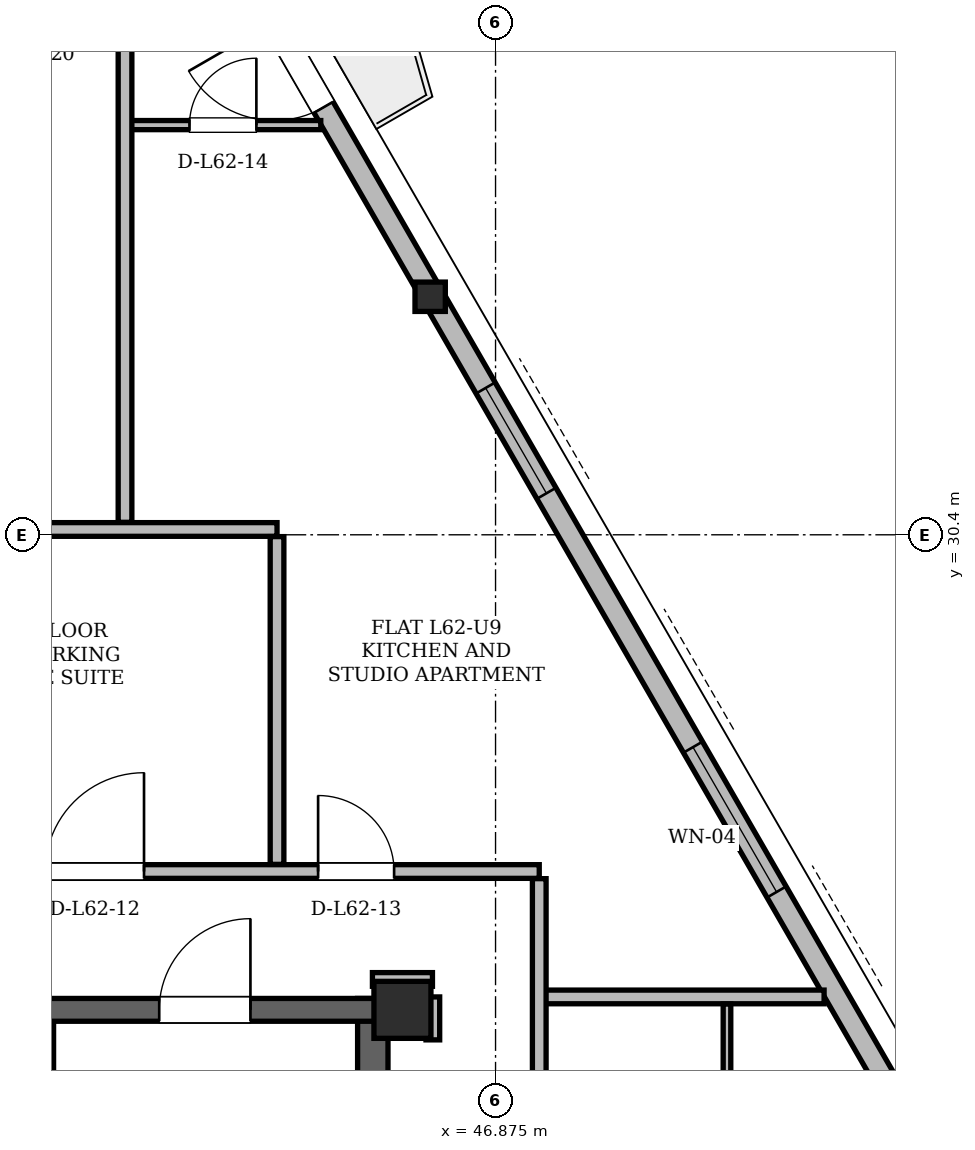
"""IFC4 building model, lengths in metres.
Left out: names, types, materials, properties, quantities, classifications, styles, units other than length and angle.
Written with IfcOpenShell. Run it as: python <this file> out.ifc"""

import sys

from ifc_helpers import new_model, si_unit, direction, frame, frame_2d, origin, origin_2d, place, context, subcontext, project, spatial, rectangle, hollow_rectangle, i_section, extrude, element, fill, save


model = new_model("IFC4")
c1 = context("Model", 3, precision=1e-05, world=origin(), true_north=direction((0.0, 1.0)))
c2 = subcontext(c1, "Body", "Model", "MODEL_VIEW")
j1 = project(units=[si_unit("LENGTHUNIT", "METRE"), si_unit("PLANEANGLEUNIT", "RADIAN")], contexts=[c1])
p1 = place(None, origin())
s1 = spatial("IfcSite", under=j1, at=p1, CompositionType="ELEMENT")
p2 = place(p1, origin())
s2 = spatial("IfcBuilding", under=s1, at=p2, CompositionType="ELEMENT")
p3 = place(p2, frame((0.0, 0.0, 234.3)))
s3 = spatial("IfcBuildingStorey", under=s2, at=p3, CompositionType="ELEMENT", Elevation=234.3)
p4 = place(p3, frame((45.65, 24.15, 0.0), z_axis=(0.0, 0.0, 1.0), x_axis=(1.0, 0.0, 0.0)))
e1 = element("IfcColumn", 1, at=p4, inside=s3, PredefinedType="COLUMN", context=c2, shape_type="SweptSolid", body=[
    extrude(hollow_rectangle(XDim=0.75, YDim=0.75, WallThickness=0.06, at=origin_2d()), origin(), (0.0, 0.0, 1.0), 3.6),
])
p5 = place(p3, frame((46.045, 33.543, 0.004), z_axis=(-0.016857685475, -0.006389606591, 0.999837482478), x_axis=(0.354426896262, -0.935083726308, 0.0)))
e2 = element("IfcColumn", 2, at=p5, inside=s3, PredefinedType="COLUMN", context=c2, shape_type="SweptSolid", body=[
    extrude(i_section(OverallWidth=0.399, OverallDepth=0.386, WebThickness=0.021, FlangeThickness=0.033, at=origin_2d()), origin(), (0.0, 0.0, 1.0), 3.592),
])
p6 = place(p3, frame((45.26, 11.0, 0.0), z_axis=(0.0, 0.0, 1.0), x_axis=(0.0, 1.0, 0.0)))
e3 = element("IfcWall", 3, at=p6, inside=s3, PredefinedType="SHEAR", context=c2, shape_type="SweptSolid", body=[
    extrude(rectangle(XDim=13.3, YDim=0.4, at=frame_2d((6.65, 0.0))), origin(), (0.0, 0.0, 1.0), 3.38),
])
p7 = place(p3, frame((29.65, 24.15, 0.0), z_axis=(0.0, 0.0, 1.0), x_axis=(1.0, 0.0, 0.0)))
e4 = element("IfcWall", 4, at=p7, inside=s3, PredefinedType="SHEAR", context=c2, shape_type="SweptSolid", body=[
    extrude(rectangle(XDim=15.7, YDim=0.3, at=frame_2d((7.85, 0.0))), origin(), (0.0, 0.0, 1.0), 3.38),
])
p8 = place(p7, frame((1.7, 0.0, 0.0)))
e5 = element("IfcOpeningElement", 5, at=p8, cuts=e4, PredefinedType="OPENING", context=c2, shape_type="SweptSolid", body=[
    extrude(rectangle(XDim=1.2, YDim=2.2, at=frame_2d((0.6, 1.1))), frame((0.0, 0.15, 0.0), z_axis=(0.0, -1.0, 0.0), x_axis=(1.0, 0.0, 0.0)), (0.0, 0.0, 1.0), 0.3),
])
p9 = place(p7, frame((12.8, 0.0, 0.0)))
e6 = element("IfcOpeningElement", 6, at=p9, cuts=e4, PredefinedType="OPENING", context=c2, shape_type="SweptSolid", body=[
    extrude(rectangle(XDim=1.2, YDim=2.2, at=frame_2d((0.6, 1.1))), frame((0.0, 0.15, 0.0), z_axis=(0.0, -1.0, 0.0), x_axis=(1.0, 0.0, 0.0)), (0.0, 0.0, 1.0), 0.3),
])
p10 = place(p7, frame((7.4, 0.0, 0.0)))
e7 = element("IfcOpeningElement", 7, at=p10, cuts=e4, PredefinedType="OPENING", context=c2, shape_type="SweptSolid", body=[
    extrude(rectangle(XDim=0.9, YDim=2.05, at=frame_2d((0.45, 1.025))), frame((0.0, 0.15, 0.0), z_axis=(0.0, -1.0, 0.0), x_axis=(1.0, 0.0, 0.0)), (0.0, 0.0, 1.0), 0.3),
])
p11 = place(p3, frame((58.942, 11.205, 0.0), z_axis=(0.0, 0.0, 1.0), x_axis=(-0.500000614513, 0.866025048995, 0.0)))
e8 = element("IfcWall", 8, at=p11, inside=s3, PredefinedType="SOLIDWALL", context=c2, shape_type="SweptSolid", body=[
    extrude(rectangle(XDim=36.848, YDim=0.29, at=frame_2d((18.424, 0.0))), origin(), (0.0, 0.0, 1.0), 2.677),
])
p12 = place(p11, frame((7.615, 0.0, 0.0)))
e9 = element("IfcOpeningElement", 9, at=p12, cuts=e8, PredefinedType="OPENING", context=c2, shape_type="SweptSolid", body=[
    extrude(rectangle(XDim=1.5, YDim=2.2, at=frame_2d((0.75, 1.1))), frame((0.0, 0.145, 0.0), z_axis=(0.0, -1.0, 0.0), x_axis=(1.0, 0.0, 0.0)), (0.0, 0.0, 1.0), 0.29),
])
p13 = place(p11, frame((28.658, 0.0, 0.0)))
e10 = element("IfcOpeningElement", 10, at=p13, cuts=e8, PredefinedType="OPENING", context=c2, shape_type="SweptSolid", body=[
    extrude(rectangle(XDim=1.3, YDim=2.2, at=frame_2d((0.65, 1.1))), frame((0.0, 0.145, 0.0), z_axis=(0.0, -1.0, 0.0), x_axis=(1.0, 0.0, 0.0)), (0.0, 0.0, 1.0), 0.29),
])
p14 = place(p11, frame((3.643, 0.0, 0.85)))
e11 = element("IfcOpeningElement", 11, at=p14, cuts=e8, PredefinedType="OPENING", context=c2, shape_type="SweptSolid", body=[
    extrude(rectangle(XDim=1.2, YDim=1.48, at=frame_2d((0.6, 0.74))), frame((0.0, 0.145, 0.0), z_axis=(0.0, -1.0, 0.0), x_axis=(1.0, 0.0, 0.0)), (0.0, 0.0, 1.0), 0.29),
])
p15 = place(p11, frame((1.09, 0.0, 0.85)))
e12 = element("IfcOpeningElement", 12, at=p15, cuts=e8, PredefinedType="OPENING", context=c2, shape_type="SweptSolid", body=[
    extrude(rectangle(XDim=1.6, YDim=1.7, at=frame_2d((0.8, 0.85))), frame((0.0, 0.145, 0.0), z_axis=(0.0, -1.0, 0.0), x_axis=(1.0, 0.0, 0.0)), (0.0, 0.0, 1.0), 0.29),
])
p16 = place(p11, frame((34.714, 0.0, 0.85)))
e13 = element("IfcOpeningElement", 13, at=p16, cuts=e8, PredefinedType="OPENING", context=c2, shape_type="SweptSolid", body=[
    extrude(rectangle(XDim=1.2, YDim=1.48, at=frame_2d((0.6, 0.74))), frame((0.0, 0.145, 0.0), z_axis=(0.0, -1.0, 0.0), x_axis=(1.0, 0.0, 0.0)), (0.0, 0.0, 1.0), 0.29),
])
p17 = place(p11, frame((31.648, 0.0, 0.85)))
e14 = element("IfcOpeningElement", 14, at=p17, cuts=e8, PredefinedType="OPENING", context=c2, shape_type="SweptSolid", body=[
    extrude(rectangle(XDim=1.2, YDim=1.48, at=frame_2d((0.6, 0.74))), frame((0.0, 0.145, 0.0), z_axis=(0.0, -1.0, 0.0), x_axis=(1.0, 0.0, 0.0)), (0.0, 0.0, 1.0), 0.29),
])
p18 = place(p11, frame((16.738, 0.0, 0.85)))
e15 = element("IfcOpeningElement", 15, at=p18, cuts=e8, PredefinedType="OPENING", context=c2, shape_type="SweptSolid", body=[
    extrude(rectangle(XDim=2.2, YDim=1.717, at=frame_2d((1.1, 0.858))), frame((0.0, 0.145, 0.0), z_axis=(0.0, -1.0, 0.0), x_axis=(1.0, 0.0, 0.0)), (0.0, 0.0, 1.0), 0.29),
])
p19 = place(p11, frame((22.794, 0.0, 0.85)))
e16 = element("IfcOpeningElement", 16, at=p19, cuts=e8, PredefinedType="OPENING", context=c2, shape_type="SweptSolid", body=[
    extrude(rectangle(XDim=1.6, YDim=1.7, at=frame_2d((0.8, 0.85))), frame((0.0, 0.145, 0.0), z_axis=(0.0, -1.0, 0.0), x_axis=(1.0, 0.0, 0.0)), (0.0, 0.0, 1.0), 0.29),
])
p20 = place(p11, frame((12.349, 0.0, 0.85)))
e17 = element("IfcOpeningElement", 17, at=p20, cuts=e8, PredefinedType="OPENING", context=c2, shape_type="SweptSolid", body=[
    extrude(rectangle(XDim=1.2, YDim=1.48, at=frame_2d((0.6, 0.74))), frame((0.0, 0.145, 0.0), z_axis=(0.0, -1.0, 0.0), x_axis=(1.0, 0.0, 0.0)), (0.0, 0.0, 1.0), 0.29),
])
p21 = place(p3, frame((40.96, 19.48, 0.0), z_axis=(0.0, 0.0, 1.0), x_axis=(0.0, 1.0, 0.0)))
e18 = element("IfcWall", 18, at=p21, inside=s3, PredefinedType="PARTITIONING", context=c2, shape_type="SweptSolid", body=[
    extrude(rectangle(XDim=4.5, YDim=0.2, at=frame_2d((2.25, 0.0))), origin(), (0.0, 0.0, 1.0), 3.38),
])
p22 = place(p21, frame((2.12, 0.0, 0.0)))
e19 = element("IfcOpeningElement", 19, at=p22, cuts=e18, PredefinedType="OPENING", context=c2, shape_type="SweptSolid", body=[
    extrude(rectangle(XDim=1.1, YDim=2.2, at=frame_2d((0.55, 1.1))), frame((0.0, 0.1, 0.0), z_axis=(0.0, -1.0, 0.0), x_axis=(1.0, 0.0, 0.0)), (0.0, 0.0, 1.0), 0.2),
])
p23 = place(p3, frame((47.45, 24.32, 0.0), z_axis=(0.0, 0.0, 1.0), x_axis=(1.0, 0.0, 0.0)))
e20 = element("IfcWall", 20, at=p23, inside=s3, PredefinedType="PARTITIONING", context=c2, shape_type="SweptSolid", body=[
    extrude(rectangle(XDim=3.748, YDim=0.18, at=frame_2d((1.874, 0.0))), origin(), (0.0, 0.0, 1.0), 3.38),
])
p24 = place(p3, frame((45.255, 24.55, 0.0), z_axis=(0.0, 0.0, 1.0), x_axis=(1.0, 0.0, 0.0)))
e21 = element("IfcWall", 21, at=p24, inside=s3, PredefinedType="PARTITIONING", context=c2, shape_type="SweptSolid", body=[
    extrude(rectangle(XDim=0.79, YDim=0.18, at=frame_2d((0.395, 0.0))), origin(), (0.0, 0.0, 1.0), 2.913),
])
p25 = place(p3, frame((25.6, 25.97, 0.0), z_axis=(0.0, 0.0, 1.0), x_axis=(1.0, 0.0, 0.0)))
e22 = element("IfcWall", 22, at=p25, inside=s3, PredefinedType="PARTITIONING", context=c2, shape_type="SweptSolid", body=[
    extrude(rectangle(XDim=21.85, YDim=0.18, at=frame_2d((10.925, 0.0))), origin(), (0.0, 0.0, 1.0), 2.913),
])
p26 = place(p25, frame((3.87, 0.0, 0.0)))
e23 = element("IfcOpeningElement", 23, at=p26, cuts=e22, PredefinedType="OPENING", context=c2, shape_type="SweptSolid", body=[
    extrude(rectangle(XDim=1.0, YDim=2.18, at=frame_2d((0.5, 1.09))), frame((0.0, 0.09, 0.0), z_axis=(0.0, -1.0, 0.0), x_axis=(1.0, 0.0, 0.0)), (0.0, 0.0, 1.0), 0.18),
])
p27 = place(p25, frame((9.833, 0.0, 0.0)))
e24 = element("IfcOpeningElement", 24, at=p27, cuts=e22, PredefinedType="OPENING", context=c2, shape_type="SweptSolid", body=[
    extrude(rectangle(XDim=1.0, YDim=2.18, at=frame_2d((0.5, 1.09))), frame((0.0, 0.09, 0.0), z_axis=(0.0, -1.0, 0.0), x_axis=(1.0, 0.0, 0.0)), (0.0, 0.0, 1.0), 0.18),
])
p28 = place(p25, frame((15.35, 0.0, 0.0)))
e25 = element("IfcOpeningElement", 25, at=p28, cuts=e22, PredefinedType="OPENING", context=c2, shape_type="SweptSolid", body=[
    extrude(rectangle(XDim=1.3, YDim=2.2, at=frame_2d((0.65, 1.1))), frame((0.0, 0.09, 0.0), z_axis=(0.0, -1.0, 0.0), x_axis=(1.0, 0.0, 0.0)), (0.0, 0.0, 1.0), 0.18),
])
p29 = place(p25, frame((18.94, 0.0, 0.0)))
e26 = element("IfcOpeningElement", 26, at=p29, cuts=e22, PredefinedType="OPENING", context=c2, shape_type="SweptSolid", body=[
    extrude(rectangle(XDim=1.0, YDim=2.18, at=frame_2d((0.5, 1.09))), frame((0.0, 0.09, 0.0), z_axis=(0.0, -1.0, 0.0), x_axis=(1.0, 0.0, 0.0)), (0.0, 0.0, 1.0), 0.18),
])
p30 = place(p3, frame((39.2, 30.47, 0.0), z_axis=(0.0, 0.0, 1.0), x_axis=(1.0, 0.0, 0.0)))
e27 = element("IfcWall", 27, at=p30, inside=s3, PredefinedType="PARTITIONING", context=c2, shape_type="SweptSolid", body=[
    extrude(rectangle(XDim=4.8, YDim=0.18, at=frame_2d((2.4, 0.0))), origin(), (0.0, 0.0, 1.0), 2.913),
])
p31 = place(p3, frame((41.918, 35.79, 0.0), z_axis=(0.0, 0.0, 1.0), x_axis=(1.0, 0.0, 0.0)))
e28 = element("IfcWall", 28, at=p31, inside=s3, PredefinedType="PARTITIONING", context=c2, shape_type="SweptSolid", body=[
    extrude(rectangle(XDim=2.657, YDim=0.12, at=frame_2d((1.329, 0.0))), origin(), (0.0, 0.0, 1.0), 2.913),
])
p32 = place(p31, frame((0.93, 0.0, 0.0)))
e29 = element("IfcOpeningElement", 29, at=p32, cuts=e28, PredefinedType="OPENING", context=c2, shape_type="SweptSolid", body=[
    extrude(rectangle(XDim=0.88, YDim=2.08, at=frame_2d((0.44, 1.04))), frame((0.0, 0.06, 0.0), z_axis=(0.0, -1.0, 0.0), x_axis=(1.0, 0.0, 0.0)), (0.0, 0.0, 1.0), 0.12),
])
p33 = place(p3, frame((42.0, 30.564, 0.0), z_axis=(0.0, 0.0, 1.0), x_axis=(0.0, 1.0, 0.0)))
e30 = element("IfcWall", 30, at=p33, inside=s3, PredefinedType="PARTITIONING", context=c2, shape_type="SweptSolid", body=[
    extrude(rectangle(XDim=9.687, YDim=0.18, at=frame_2d((4.844, 0.0))), origin(), (0.0, 0.0, 1.0), 2.913),
])
p34 = place(p3, frame((44.0, 26.064, 0.0), z_axis=(0.0, 0.0, 1.0), x_axis=(0.0, 1.0, 0.0)))
e31 = element("IfcWall", 31, at=p34, inside=s3, PredefinedType="PARTITIONING", context=c2, shape_type="SweptSolid", body=[
    extrude(rectangle(XDim=4.312, YDim=0.18, at=frame_2d((2.156, 0.0))), origin(), (0.0, 0.0, 1.0), 2.913),
])
p35 = place(p3, frame((46.05, 23.755, 0.0), z_axis=(0.0, 0.0, 1.0), x_axis=(0.0, 1.0, 0.0)))
e32 = element("IfcWall", 32, at=p35, inside=s3, PredefinedType="PARTITIONING", context=c2, shape_type="SweptSolid", body=[
    extrude(rectangle(XDim=0.565, YDim=0.18, at=frame_2d((0.283, 0.0))), origin(), (0.0, 0.0, 1.0), 3.38),
])
p36 = place(p3, frame((47.45, 9.394, 0.0), z_axis=(0.0, 0.0, 1.0), x_axis=(0.0, 1.0, 0.0)))
e33 = element("IfcWall", 33, at=p36, inside=s3, PredefinedType="PARTITIONING", context=c2, shape_type="SweptSolid", body=[
    extrude(rectangle(XDim=16.482, YDim=0.18, at=frame_2d((8.241, 0.0))), origin(), (0.0, 0.0, 1.0), 2.913),
])
p37 = place(p36, frame((6.247, 0.0, 0.0)))
e34 = element("IfcOpeningElement", 34, at=p37, cuts=e33, PredefinedType="OPENING", context=c2, shape_type="SweptSolid", body=[
    extrude(rectangle(XDim=1.0, YDim=2.18, at=frame_2d((0.5, 1.09))), frame((0.0, 0.09, 0.0), z_axis=(0.0, -1.0, 0.0), x_axis=(1.0, 0.0, 0.0)), (0.0, 0.0, 1.0), 0.18),
])
p38 = place(p36, frame((10.379, 0.0, 0.0)))
e35 = element("IfcOpeningElement", 35, at=p38, cuts=e33, PredefinedType="OPENING", context=c2, shape_type="SweptSolid", body=[
    extrude(rectangle(XDim=1.0, YDim=2.18, at=frame_2d((0.5, 1.09))), frame((0.0, 0.09, 0.0), z_axis=(0.0, -1.0, 0.0), x_axis=(1.0, 0.0, 0.0)), (0.0, 0.0, 1.0), 0.18),
])
p39 = place(p3, frame((49.92, 21.974, 0.0), z_axis=(0.0, 0.0, 1.0), x_axis=(0.0, 1.0, 0.0)))
e36 = element("IfcWall", 36, at=p39, inside=s3, PredefinedType="PARTITIONING", context=c2, shape_type="SweptSolid", body=[
    extrude(rectangle(XDim=2.252, YDim=0.1, at=frame_2d((1.126, 0.0))), origin(), (0.0, 0.0, 1.0), 3.38),
])
p40 = place(p13, origin())
e37 = element("IfcDoor", 37, at=p40, inside=s3, OperationType="SINGLE_SWING_RIGHT", PredefinedType="DOOR", context=c2, shape_type="SweptSolid", body=[
    extrude(rectangle(XDim=1.3, YDim=2.2, at=frame_2d((0.65, 1.1))), frame((0.0, 0.025, 0.0), z_axis=(0.0, -1.0, 0.0), x_axis=(1.0, 0.0, 0.0)), (0.0, 0.0, 1.0), 0.05),
])
fill(e10, e37)
p41 = place(p18, origin())
e38 = element("IfcWindow", 38, at=p41, inside=s3, PartitioningType="SINGLE_PANEL", PredefinedType="WINDOW", context=c2, shape_type="SweptSolid", body=[
    extrude(rectangle(XDim=2.2, YDim=1.717, at=frame_2d((1.1, 0.858))), frame((0.0, 0.03, 0.0), z_axis=(0.0, -1.0, 0.0), x_axis=(1.0, 0.0, 0.0)), (0.0, 0.0, 1.0), 0.06),
])
fill(e15, e38)
p42 = place(p19, origin())
e39 = element("IfcWindow", 39, at=p42, inside=s3, PartitioningType="SINGLE_PANEL", PredefinedType="WINDOW", context=c2, shape_type="SweptSolid", body=[
    extrude(rectangle(XDim=1.6, YDim=1.7, at=frame_2d((0.8, 0.85))), frame((0.0, 0.03, 0.0), z_axis=(0.0, -1.0, 0.0), x_axis=(1.0, 0.0, 0.0)), (0.0, 0.0, 1.0), 0.06),
])
fill(e16, e39)
p43 = place(p9, origin())
e40 = element("IfcDoor", 40, at=p43, inside=s3, OperationType="SINGLE_SWING_RIGHT", PredefinedType="DOOR", context=c2, shape_type="SweptSolid", body=[
    extrude(rectangle(XDim=1.2, YDim=2.2, at=frame_2d((0.6, 1.1))), frame((0.0, 0.025, 0.0), z_axis=(0.0, -1.0, 0.0), x_axis=(1.0, 0.0, 0.0)), (0.0, 0.0, 1.0), 0.05),
])
fill(e6, e40)
p44 = place(p28, origin())
e41 = element("IfcDoor", 41, at=p44, inside=s3, OperationType="SINGLE_SWING_RIGHT", PredefinedType="DOOR", context=c2, shape_type="SweptSolid", body=[
    extrude(rectangle(XDim=1.3, YDim=2.2, at=frame_2d((0.65, 1.1))), frame((0.0, 0.025, 0.0), z_axis=(0.0, -1.0, 0.0), x_axis=(1.0, 0.0, 0.0)), (0.0, 0.0, 1.0), 0.05),
])
fill(e25, e41)
p45 = place(p29, origin())
e42 = element("IfcDoor", 42, at=p45, inside=s3, OperationType="SINGLE_SWING_LEFT", PredefinedType="DOOR", context=c2, shape_type="SweptSolid", body=[
    extrude(rectangle(XDim=1.0, YDim=2.18, at=frame_2d((0.5, 1.09))), frame((0.0, 0.025, 0.0), z_axis=(0.0, -1.0, 0.0), x_axis=(1.0, 0.0, 0.0)), (0.0, 0.0, 1.0), 0.05),
])
fill(e26, e42)
p46 = place(p32, origin())
e43 = element("IfcDoor", 43, at=p46, inside=s3, OperationType="SINGLE_SWING_RIGHT", PredefinedType="DOOR", context=c2, shape_type="SweptSolid", body=[
    extrude(rectangle(XDim=0.88, YDim=2.08, at=frame_2d((0.44, 1.04))), frame((0.0, 0.025, 0.0), z_axis=(0.0, -1.0, 0.0), x_axis=(1.0, 0.0, 0.0)), (0.0, 0.0, 1.0), 0.05),
])
fill(e29, e43)
save(model, sys.argv[1])
